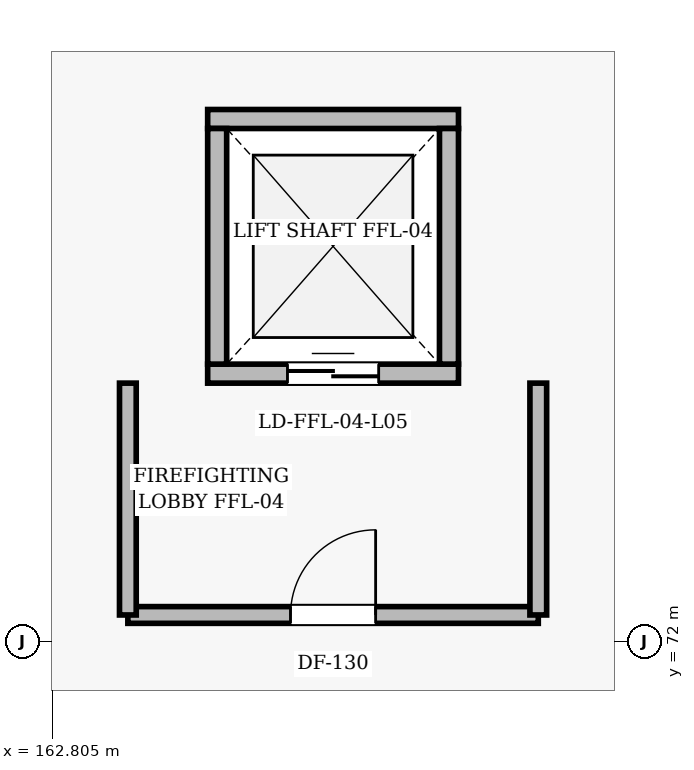
"""IFC4 building model, lengths in metres.
Left out: names, types, materials, properties, quantities, classifications, styles, units other than length and angle.
Written with IfcOpenShell. Run it as: python <this file> out.ifc"""

import sys

from ifc_helpers import new_model, si_unit, direction, frame, frame_2d, origin, place, context, subcontext, project, spatial, rectangle, extrude, element, fill, save


model = new_model("IFC4")
c1 = context("Model", 3, precision=1e-05, world=origin(), true_north=direction((0.0, 1.0)))
c2 = subcontext(c1, "Body", "Model", "MODEL_VIEW")
j1 = project(units=[si_unit("LENGTHUNIT", "METRE"), si_unit("PLANEANGLEUNIT", "RADIAN")], contexts=[c1])
p1 = place(None, origin())
s1 = spatial("IfcSite", under=j1, at=p1, CompositionType="ELEMENT")
p2 = place(p1, origin())
s2 = spatial("IfcBuilding", under=s1, at=p2, CompositionType="ELEMENT")
p3 = place(p2, frame((0.0, 0.0, 25.2)))
s3 = spatial("IfcBuildingStorey", under=s2, at=p3, CompositionType="ELEMENT", Elevation=25.2)
p4 = place(p3, frame((164.85, 75.525, 0.0), z_axis=(0.0, 0.0, 1.0), x_axis=(1.0, 0.0, 0.0)))
e1 = element("IfcWall", 1, at=p4, inside=s3, PredefinedType="SOLIDWALL", context=c2, shape_type="SweptSolid", body=[
    extrude(rectangle(XDim=3.3, YDim=0.25, at=frame_2d((1.65, 0.0))), origin(), (0.0, 0.0, 1.0), 4.6),
])
p5 = place(p4, frame((1.05, 0.0, 0.0)))
e2 = element("IfcOpeningElement", 2, at=p5, cuts=e1, PredefinedType="OPENING", context=c2, shape_type="SweptSolid", body=[
    extrude(rectangle(XDim=1.2, YDim=2.25, at=frame_2d((0.6, 1.125))), frame((0.0, 0.135, 0.0), z_axis=(0.0, -1.0, 0.0), x_axis=(1.0, 0.0, 0.0)), (0.0, 0.0, 1.0), 0.27),
])
p6 = place(p3, frame((168.15, 78.875, 0.0), z_axis=(0.0, 0.0, 1.0), x_axis=(-1.0, 0.0, 0.0)))
e3 = element("IfcWall", 3, at=p6, inside=s3, PredefinedType="SOLIDWALL", context=c2, shape_type="SweptSolid", body=[
    extrude(rectangle(XDim=3.3, YDim=0.25, at=frame_2d((1.65, 0.0))), origin(), (0.0, 0.0, 1.0), 4.6),
])
for number, where, z_axis, x_axis in (
    (4, (164.975, 78.75, 0.0), (0.0, 0.0, 1.0), (0.0, -1.0, 0.0)),
    (5, (168.025, 75.65, 0.0), (0.0, 0.0, 1.0), (0.0, 1.0, 0.0)),
):
    element("IfcWall", number, at=place(p3, frame(where, z_axis=z_axis, x_axis=x_axis)), inside=s3, PredefinedType="SOLIDWALL", context=c2, shape_type="SweptSolid", body=[
        extrude(rectangle(XDim=3.1, YDim=0.25, at=frame_2d((1.55, 0.0))), origin(), (0.0, 0.0, 1.0), 3.972),
    ])
p7 = place(p3, frame((163.8, 72.35, 0.0), z_axis=(0.0, 0.0, 1.0), x_axis=(1.0, 0.0, 0.0)))
e6 = element("IfcWall", 6, at=p7, inside=s3, PredefinedType="SOLIDWALL", context=c2, shape_type="SweptSolid", body=[
    extrude(rectangle(XDim=5.4, YDim=0.22, at=frame_2d((2.7, 0.0))), origin(), (0.0, 0.0, 1.0), 3.885),
])
p8 = place(p7, frame((2.14, 0.0, 0.0)))
e7 = element("IfcOpeningElement", 7, at=p8, cuts=e6, PredefinedType="OPENING", context=c2, shape_type="SweptSolid", body=[
    extrude(rectangle(XDim=1.12, YDim=2.2, at=frame_2d((0.56, 1.1))), frame((0.0, 0.12, 0.0), z_axis=(0.0, -1.0, 0.0), x_axis=(1.0, 0.0, 0.0)), (0.0, 0.0, 1.0), 0.24),
])
for number, where, z_axis, x_axis in (
    (8, (163.8, 72.35, 0.0), (0.0, 0.0, 1.0), (0.0, 1.0, 0.0)),
    (9, (169.2, 72.35, 0.0), (0.0, 0.0, 1.0), (0.0, 1.0, 0.0)),
):
    element("IfcWall", number, at=place(p3, frame(where, z_axis=z_axis, x_axis=x_axis)), inside=s3, PredefinedType="SOLIDWALL", context=c2, shape_type="SweptSolid", body=[
        extrude(rectangle(XDim=3.05, YDim=0.22, at=frame_2d((1.525, 0.0))), origin(), (0.0, 0.0, 1.0), 3.885),
    ])
p9 = place(p5, origin())
e10 = element("IfcDoor", 10, at=p9, inside=s3, OperationType="DOUBLE_DOOR_SLIDING", PredefinedType="DOOR", context=c2, shape_type="SweptSolid", body=[
    extrude(rectangle(XDim=1.2, YDim=2.25, at=frame_2d((0.6, 1.125))), frame((0.0, 0.025, 0.0), z_axis=(0.0, -1.0, 0.0), x_axis=(1.0, 0.0, 0.0)), (0.0, 0.0, 1.0), 0.05),
])
fill(e2, e10)
p10 = place(p8, origin())
e11 = element("IfcDoor", 11, at=p10, inside=s3, OperationType="SINGLE_SWING_RIGHT", PredefinedType="DOOR", context=c2, shape_type="SweptSolid", body=[
    extrude(rectangle(XDim=1.12, YDim=2.2, at=frame_2d((0.56, 1.1))), frame((0.0, 0.025, 0.0), z_axis=(0.0, -1.0, 0.0), x_axis=(1.0, 0.0, 0.0)), (0.0, 0.0, 1.0), 0.05),
])
fill(e7, e11)
save(model, sys.argv[1])
